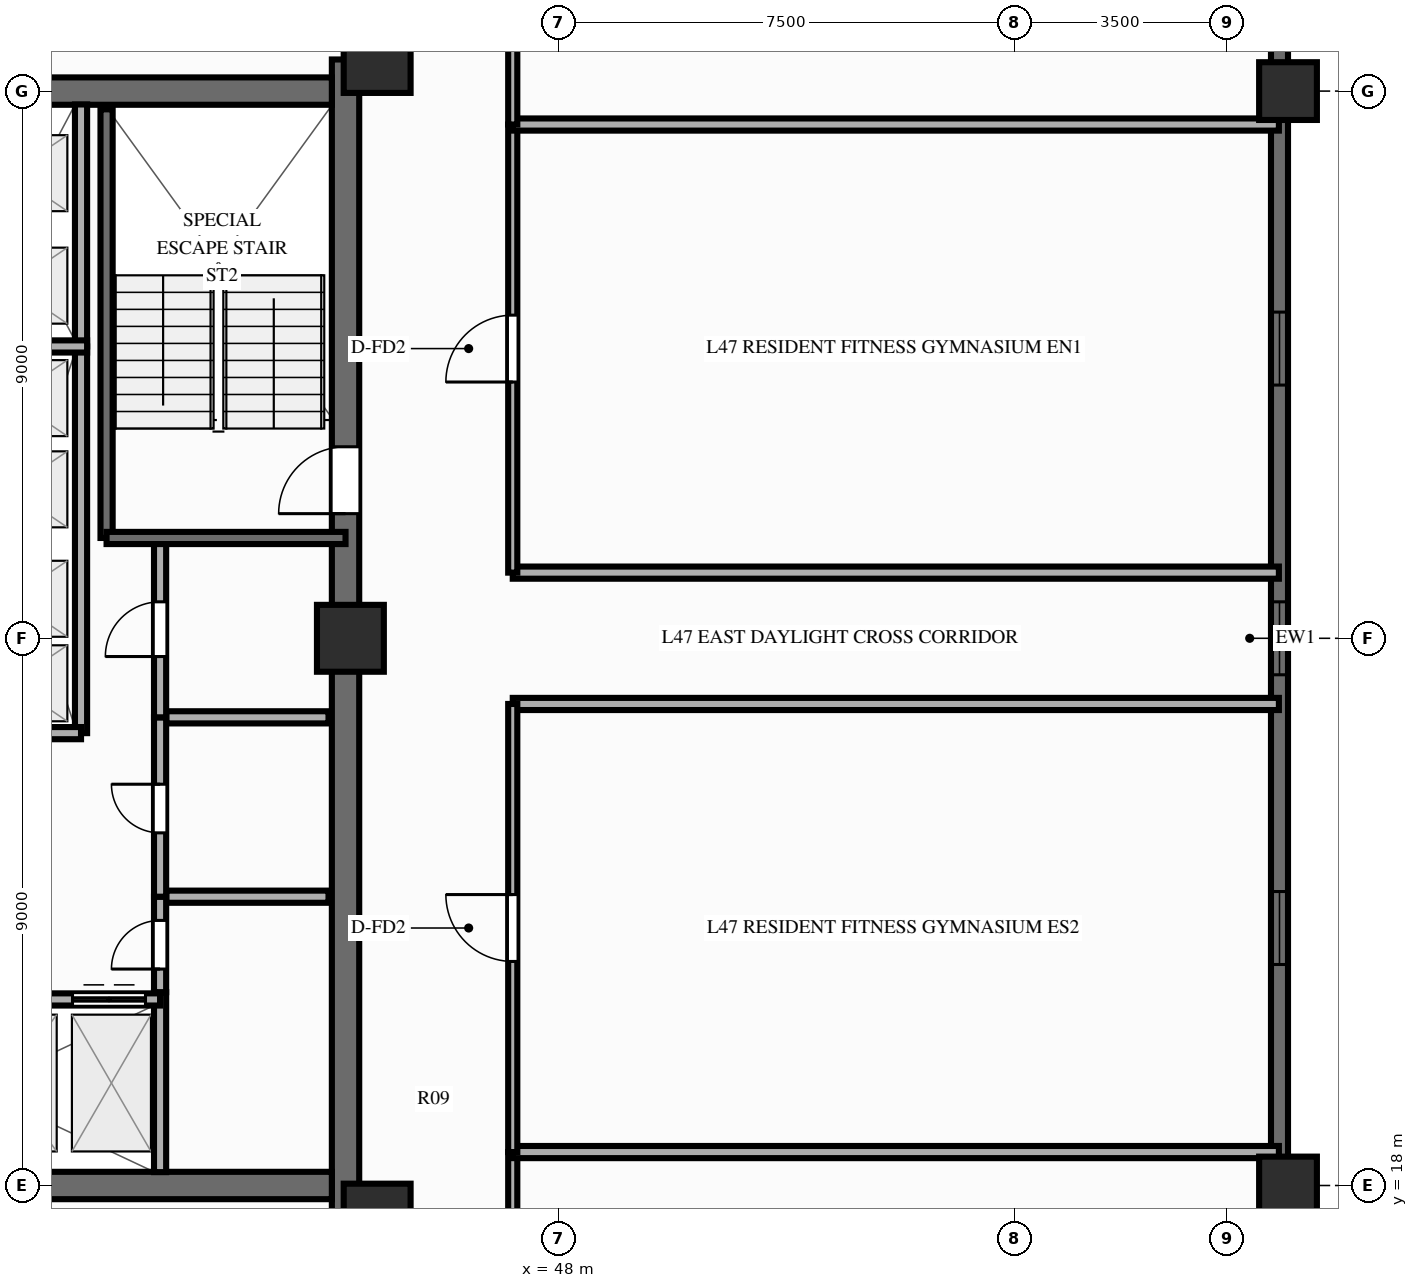
"""IFC4 building model, lengths in metres.
Left out: names, types, materials, properties, quantities, classifications, styles, units other than length and angle.
Written with IfcOpenShell. Run it as: python <this file> out.ifc"""

import sys

from ifc_helpers import new_model, si_unit, direction, frame, frame_2d, origin, origin_2d, place, context, subcontext, project, spatial, rectangle, extrude, source, transform, mapped, element, fill, save


model = new_model("IFC4")
c1 = context("Model", 3, precision=1e-05, world=origin(), true_north=direction((0.0, 1.0)))
c2 = subcontext(c1, "Body", "Model", "MODEL_VIEW")
j1 = project(units=[si_unit("LENGTHUNIT", "METRE"), si_unit("PLANEANGLEUNIT", "RADIAN")], contexts=[c1])
p1 = place(None, origin())
s1 = spatial("IfcSite", under=j1, at=p1, CompositionType="ELEMENT")
p2 = place(p1, origin())
s2 = spatial("IfcBuilding", under=s1, at=p2, CompositionType="ELEMENT")
p3 = place(p2, frame((0.0, 0.0, 148.7)))
s3 = spatial("IfcBuildingStorey", under=s2, at=p3, CompositionType="ELEMENT", Elevation=148.7)
p4 = place(p3, frame((44.5, 17.48, 0.0), z_axis=(0.0, 0.0, 1.0), x_axis=(0.0, 1.0, 0.0)))
e1 = element("IfcWall", 1, at=p4, inside=s3, PredefinedType="SHEAR", context=c2, shape_type="SweptSolid", body=[
    extrude(rectangle(XDim=19.04, YDim=0.45, at=frame_2d((9.52, 0.0))), origin(), (0.0, 0.0, 1.0), 3.5),
])
p5 = place(p4, frame((12.67, 0.0, 0.0), z_axis=(0.0, 0.0, 1.0), x_axis=(-1.0, 0.0, 0.0)))
e2 = element("IfcOpeningElement", 2, at=p5, cuts=e1, PredefinedType="OPENING", context=c2, shape_type="SweptSolid", body=[
    extrude(rectangle(XDim=1.1, YDim=2.15, at=frame_2d((0.55, 1.075))), frame((0.0, 0.237, 0.0), z_axis=(0.0, -1.0, 0.0), x_axis=(1.0, 0.0, 0.0)), (0.0, 0.0, 1.0), 0.474),
])
p6 = place(p3, frame((31.725, 18.0, 0.0), z_axis=(0.0, 0.0, 1.0), x_axis=(1.0, 0.0, 0.0)))
e3 = element("IfcWall", 3, at=p6, inside=s3, PredefinedType="SHEAR", context=c2, shape_type="SweptSolid", body=[
    extrude(rectangle(XDim=12.55, YDim=0.45, at=frame_2d((6.275, 0.0))), origin(), (0.0, 0.0, 1.0), 3.5),
])
p7 = place(p3, frame((31.725, 36.0, 0.0), z_axis=(0.0, 0.0, 1.0), x_axis=(1.0, 0.0, 0.0)))
e4 = element("IfcWall", 4, at=p7, inside=s3, PredefinedType="SHEAR", context=c2, shape_type="SweptSolid", body=[
    extrude(rectangle(XDim=12.55, YDim=0.45, at=frame_2d((6.275, 0.0))), origin(), (0.0, 0.0, 1.0), 3.5),
])
p8 = place(p7, frame((5.225, 0.0, 0.0), z_axis=(0.0, 0.0, 1.0), x_axis=(-1.0, 0.0, 0.0)))
e5 = element("IfcOpeningElement", 5, at=p8, cuts=e4, PredefinedType="OPENING", context=c2, shape_type="SweptSolid", body=[
    extrude(rectangle(XDim=1.4, YDim=2.15, at=frame_2d((0.7, 1.075))), frame((0.0, 0.237, 0.0), z_axis=(0.0, -1.0, 0.0), x_axis=(1.0, 0.0, 0.0)), (0.0, 0.0, 1.0), 0.474),
])
m1 = source(origin(), c2, "Body", "SweptSolid", [
    extrude(rectangle(XDim=1.1, YDim=1.1, at=origin_2d()), origin(), (0.0, 0.0, 1.0), 3.5),
])
for number, where, z_axis, x_axis in (
    (6, (45.02, 17.48, 0.0), (0.0, 0.0, 1.0), (1.0, 0.0, 0.0)),
    (7, (45.02, 36.52, 0.0), (0.0, 0.0, 1.0), (1.0, 0.0, 0.0)),
    (8, (44.58, 27.0, 0.0), (0.0, 0.0, 1.0), (1.0, 0.0, 0.0)),
):
    element("IfcColumn", number, at=place(p3, frame(where, z_axis=z_axis, x_axis=x_axis)), inside=s3, PredefinedType="COLUMN", context=c2, shape_type="MappedRepresentation", body=[
        mapped(m1, transform((0.0, 0.0, 0.0), scale=1.0)),
    ])
m2 = source(origin(), c2, "Body", "SweptSolid", [
    extrude(rectangle(XDim=0.95, YDim=0.95, at=origin_2d()), origin(), (0.0, 0.0, 1.0), 3.5),
])
for number, where, z_axis, x_axis in (
    (9, (60.0, 18.0, 0.0), (0.0, 0.0, 1.0), (1.0, 0.0, 0.0)),
    (10, (60.0, 36.0, 0.0), (0.0, 0.0, 1.0), (1.0, 0.0, 0.0)),
):
    element("IfcColumn", number, at=place(p3, frame(where, z_axis=z_axis, x_axis=x_axis)), inside=s3, PredefinedType="COLUMN", context=c2, shape_type="MappedRepresentation", body=[
        mapped(m2, transform((0.0, 0.0, 0.0), scale=1.0)),
    ])
p9 = place(p3, frame((59.86, 11.0, 0.0), z_axis=(0.0, 0.0, 1.0), x_axis=(0.0, 1.0, 0.0)))
e11 = element("IfcWall", 11, at=p9, inside=s3, PredefinedType="SOLIDWALL", context=c2, shape_type="SweptSolid", body=[
    extrude(rectangle(XDim=32.0, YDim=0.28, at=frame_2d((16.0, 0.0))), origin(), (0.0, 0.0, 1.0), 2.39),
])
p10 = place(p9, frame((2.9, 0.0, 0.25)))
e12 = element("IfcOpeningElement", 12, at=p10, cuts=e11, PredefinedType="OPENING", context=c2, shape_type="SweptSolid", body=[
    extrude(rectangle(XDim=1.2, YDim=1.5, at=frame_2d((0.6, 0.75))), frame((0.0, 0.152, 0.0), z_axis=(0.0, -1.0, 0.0), x_axis=(1.0, 0.0, 0.0)), (0.0, 0.0, 1.0), 0.304),
])
p11 = place(p9, frame((10.635, 0.0, 0.25)))
e13 = element("IfcOpeningElement", 13, at=p11, cuts=e11, PredefinedType="OPENING", context=c2, shape_type="SweptSolid", body=[
    extrude(rectangle(XDim=1.2, YDim=1.5, at=frame_2d((0.6, 0.75))), frame((0.0, 0.152, 0.0), z_axis=(0.0, -1.0, 0.0), x_axis=(1.0, 0.0, 0.0)), (0.0, 0.0, 1.0), 0.304),
])
p12 = place(p9, frame((15.4, 0.0, 0.25)))
e14 = element("IfcOpeningElement", 14, at=p12, cuts=e11, PredefinedType="OPENING", context=c2, shape_type="SweptSolid", body=[
    extrude(rectangle(XDim=1.2, YDim=1.5, at=frame_2d((0.6, 0.75))), frame((0.0, 0.152, 0.0), z_axis=(0.0, -1.0, 0.0), x_axis=(1.0, 0.0, 0.0)), (0.0, 0.0, 1.0), 0.304),
])
p13 = place(p9, frame((20.165, 0.0, 0.25)))
e15 = element("IfcOpeningElement", 15, at=p13, cuts=e11, PredefinedType="OPENING", context=c2, shape_type="SweptSolid", body=[
    extrude(rectangle(XDim=1.2, YDim=1.5, at=frame_2d((0.6, 0.75))), frame((0.0, 0.152, 0.0), z_axis=(0.0, -1.0, 0.0), x_axis=(1.0, 0.0, 0.0)), (0.0, 0.0, 1.0), 0.304),
])
p14 = place(p9, frame((27.9, 0.0, 0.25)))
e16 = element("IfcOpeningElement", 16, at=p14, cuts=e11, PredefinedType="OPENING", context=c2, shape_type="SweptSolid", body=[
    extrude(rectangle(XDim=1.2, YDim=1.5, at=frame_2d((0.6, 0.75))), frame((0.0, 0.152, 0.0), z_axis=(0.0, -1.0, 0.0), x_axis=(1.0, 0.0, 0.0)), (0.0, 0.0, 1.0), 0.304),
])
p15 = place(p3, frame((41.55, 22.75, 0.0), z_axis=(0.0, 0.0, 1.0), x_axis=(1.0, 0.0, 0.0)))
e17 = element("IfcWall", 17, at=p15, inside=s3, PredefinedType="PARTITIONING", context=c2, shape_type="SweptSolid", body=[
    extrude(rectangle(XDim=2.67, YDim=0.2, at=frame_2d((1.335, 0.0))), origin(), (0.0, 0.0, 1.0), 3.16),
])
p16 = place(p3, frame((41.55, 25.7, 0.0), z_axis=(0.0, 0.0, 1.0), x_axis=(1.0, 0.0, 0.0)))
e18 = element("IfcWall", 18, at=p16, inside=s3, PredefinedType="PARTITIONING", context=c2, shape_type="SweptSolid", body=[
    extrude(rectangle(XDim=2.67, YDim=0.2, at=frame_2d((1.335, 0.0))), origin(), (0.0, 0.0, 1.0), 2.64),
])
p17 = place(p3, frame((41.45, 18.22, 0.0), z_axis=(0.0, 0.0, 1.0), x_axis=(0.0, 1.0, 0.0)))
e19 = element("IfcWall", 19, at=p17, inside=s3, PredefinedType="PARTITIONING", context=c2, shape_type="SweptSolid", body=[
    extrude(rectangle(XDim=2.96, YDim=0.2, at=frame_2d((1.48, 0.0))), origin(), (0.0, 0.0, 1.0), 3.16),
])
p18 = place(p3, frame((41.45, 21.18, 0.0), z_axis=(0.0, 0.0, 1.0), x_axis=(0.0, 1.0, 0.0)))
e20 = element("IfcWall", 20, at=p18, inside=s3, PredefinedType="PARTITIONING", context=c2, shape_type="SweptSolid", body=[
    extrude(rectangle(XDim=1.57, YDim=0.2, at=frame_2d((0.785, 0.0))), origin(), (0.0, 0.0, 1.0), 3.16),
])
p19 = place(p18, frame((0.38, 0.0, 0.0)))
e21 = element("IfcOpeningElement", 21, at=p19, cuts=e20, PredefinedType="OPENING", context=c2, shape_type="SweptSolid", body=[
    extrude(rectangle(XDim=0.8, YDim=2.05, at=frame_2d((0.4, 1.025))), frame((0.0, 0.112, 0.0), z_axis=(0.0, -1.0, 0.0), x_axis=(1.0, 0.0, 0.0)), (0.0, 0.0, 1.0), 0.224),
])
p20 = place(p3, frame((41.45, 22.75, 0.0), z_axis=(0.0, 0.0, 1.0), x_axis=(0.0, 1.0, 0.0)))
e22 = element("IfcWall", 22, at=p20, inside=s3, PredefinedType="PARTITIONING", context=c2, shape_type="SweptSolid", body=[
    extrude(rectangle(XDim=2.95, YDim=0.2, at=frame_2d((1.475, 0.0))), origin(), (0.0, 0.0, 1.0), 3.16),
])
p21 = place(p20, frame((1.05, 0.0, 0.0)))
e23 = element("IfcOpeningElement", 23, at=p21, cuts=e22, PredefinedType="OPENING", context=c2, shape_type="SweptSolid", body=[
    extrude(rectangle(XDim=0.8, YDim=2.05, at=frame_2d((0.4, 1.025))), frame((0.0, 0.112, 0.0), z_axis=(0.0, -1.0, 0.0), x_axis=(1.0, 0.0, 0.0)), (0.0, 0.0, 1.0), 0.224),
])
p22 = place(p3, frame((41.45, 25.7, 0.0), z_axis=(0.0, 0.0, 1.0), x_axis=(0.0, 1.0, 0.0)))
e24 = element("IfcWall", 24, at=p22, inside=s3, PredefinedType="PARTITIONING", context=c2, shape_type="SweptSolid", body=[
    extrude(rectangle(XDim=2.9, YDim=0.2, at=frame_2d((1.45, 0.0))), origin(), (0.0, 0.0, 1.0), 3.16),
])
p23 = place(p22, frame((1.0, 0.0, 0.0)))
e25 = element("IfcOpeningElement", 25, at=p23, cuts=e24, PredefinedType="OPENING", context=c2, shape_type="SweptSolid", body=[
    extrude(rectangle(XDim=0.9, YDim=2.1, at=frame_2d((0.45, 1.05))), frame((0.0, 0.112, 0.0), z_axis=(0.0, -1.0, 0.0), x_axis=(1.0, 0.0, 0.0)), (0.0, 0.0, 1.0), 0.224),
])
p24 = place(p3, frame((40.15, 25.44, 0.0), z_axis=(0.0, 0.0, 1.0), x_axis=(0.0, 1.0, 0.0)))
e26 = element("IfcWall", 26, at=p24, inside=s3, PredefinedType="PARTITIONING", context=c2, shape_type="SweptSolid", body=[
    extrude(rectangle(XDim=6.36, YDim=0.2, at=frame_2d((3.18, 0.0))), origin(), (0.0, 0.0, 1.0), 3.16),
])
p25 = place(p3, frame((40.15, 31.8, 0.0), z_axis=(0.0, 0.0, 1.0), x_axis=(0.0, 1.0, 0.0)))
e27 = element("IfcWall", 27, at=p25, inside=s3, PredefinedType="PARTITIONING", context=c2, shape_type="SweptSolid", body=[
    extrude(rectangle(XDim=3.98, YDim=0.2, at=frame_2d((1.99, 0.0))), origin(), (0.0, 0.0, 1.0), 3.16),
])
p26 = place(p3, frame((35.43, 21.06, 0.0), z_axis=(0.0, 0.0, 1.0), x_axis=(1.0, 0.0, 0.0)))
e28 = element("IfcWall", 28, at=p26, inside=s3, PredefinedType="PARTITIONING", context=c2, shape_type="SweptSolid", body=[
    extrude(rectangle(XDim=6.02, YDim=0.2, at=frame_2d((3.01, 0.0))), origin(), (0.0, 0.0, 1.0), 3.16),
])
p27 = place(p26, frame((1.0, 0.0, 0.0)))
e29 = element("IfcOpeningElement", 29, at=p27, cuts=e28, PredefinedType="OPENING", context=c2, shape_type="SweptSolid", body=[
    extrude(rectangle(XDim=1.1, YDim=2.15, at=frame_2d((0.55, 1.075))), frame((0.0, 0.112, 0.0), z_axis=(0.0, -1.0, 0.0), x_axis=(1.0, 0.0, 0.0)), (0.0, 0.0, 1.0), 0.224),
])
p28 = place(p26, frame((2.95, 0.0, 0.0)))
e30 = element("IfcOpeningElement", 30, at=p28, cuts=e28, PredefinedType="OPENING", context=c2, shape_type="SweptSolid", body=[
    extrude(rectangle(XDim=1.1, YDim=2.15, at=frame_2d((0.55, 1.075))), frame((0.0, 0.112, 0.0), z_axis=(0.0, -1.0, 0.0), x_axis=(1.0, 0.0, 0.0)), (0.0, 0.0, 1.0), 0.224),
])
p29 = place(p26, frame((4.58, 0.0, 0.0)))
e31 = element("IfcOpeningElement", 31, at=p29, cuts=e28, PredefinedType="OPENING", context=c2, shape_type="SweptSolid", body=[
    extrude(rectangle(XDim=1.2, YDim=2.15, at=frame_2d((0.6, 1.075))), frame((0.0, 0.112, 0.0), z_axis=(0.0, -1.0, 0.0), x_axis=(1.0, 0.0, 0.0)), (0.0, 0.0, 1.0), 0.224),
])
p30 = place(p3, frame((35.43, 25.44, 0.0), z_axis=(0.0, 0.0, 1.0), x_axis=(1.0, 0.0, 0.0)))
e32 = element("IfcWall", 32, at=p30, inside=s3, PredefinedType="PARTITIONING", context=c2, shape_type="SweptSolid", body=[
    extrude(rectangle(XDim=4.72, YDim=0.2, at=frame_2d((2.36, 0.0))), origin(), (0.0, 0.0, 1.0), 3.16),
])
p31 = place(p30, frame((1.25, 0.0, 0.0)))
e33 = element("IfcOpeningElement", 33, at=p31, cuts=e32, PredefinedType="OPENING", context=c2, shape_type="SweptSolid", body=[
    extrude(rectangle(XDim=1.1, YDim=2.15, at=frame_2d((0.55, 1.075))), frame((0.0, 0.112, 0.0), z_axis=(0.0, -1.0, 0.0), x_axis=(1.0, 0.0, 0.0)), (0.0, 0.0, 1.0), 0.224),
])
p32 = place(p3, frame((40.57, 28.65, 0.0), z_axis=(0.0, 0.0, 1.0), x_axis=(0.0, 1.0, 0.0)))
e34 = element("IfcWall", 34, at=p32, inside=s3, PredefinedType="SOLIDWALL", context=c2, shape_type="SweptSolid", body=[
    extrude(rectangle(XDim=7.05, YDim=0.2, at=frame_2d((3.525, 0.0))), origin(), (0.0, 0.0, 1.0), 3.29),
])
p33 = place(p3, frame((40.57, 28.65, 0.0), z_axis=(0.0, 0.0, 1.0), x_axis=(1.0, 0.0, 0.0)))
e35 = element("IfcWall", 35, at=p33, inside=s3, PredefinedType="SOLIDWALL", context=c2, shape_type="SweptSolid", body=[
    extrude(rectangle(XDim=3.93, YDim=0.2, at=frame_2d((1.965, 0.0))), origin(), (0.0, 0.0, 1.0), 3.29),
])
p34 = place(p3, frame((37.9, 31.8, 0.0), z_axis=(0.0, 0.0, 1.0), x_axis=(1.0, 0.0, 0.0)))
e36 = element("IfcWall", 36, at=p34, inside=s3, PredefinedType="PARTITIONING", context=c2, shape_type="SweptSolid", body=[
    extrude(rectangle(XDim=2.35, YDim=0.2, at=frame_2d((1.175, 0.0))), origin(), (0.0, 0.0, 1.0), 3.16),
])
p35 = place(p3, frame((47.25, 25.92, 0.0), z_axis=(0.0, 0.0, 1.0), x_axis=(1.0, 0.0, 0.0)))
e37 = element("IfcWall", 37, at=p35, inside=s3, PredefinedType="PARTITIONING", context=c2, shape_type="SweptSolid", body=[
    extrude(rectangle(XDim=12.6, YDim=0.2, at=frame_2d((6.3, 0.0))), origin(), (0.0, 0.0, 1.0), 3.16),
])
p36 = place(p3, frame((47.25, 11.18, 0.0), z_axis=(0.0, 0.0, 1.0), x_axis=(0.0, 1.0, 0.0)))
e38 = element("IfcWall", 38, at=p36, inside=s3, PredefinedType="PARTITIONING", context=c2, shape_type="SweptSolid", body=[
    extrude(rectangle(XDim=7.37, YDim=0.15, at=frame_2d((3.685, 0.0))), origin(), (0.0, 0.0, 1.0), 3.16),
])
p37 = place(p36, frame((3.135, 0.0, 0.0)))
e39 = element("IfcOpeningElement", 39, at=p37, cuts=e38, PredefinedType="OPENING", context=c2, shape_type="SweptSolid", body=[
    extrude(rectangle(XDim=1.1, YDim=2.15, at=frame_2d((0.55, 1.075))), frame((0.0, 0.087, 0.0), z_axis=(0.0, -1.0, 0.0), x_axis=(1.0, 0.0, 0.0)), (0.0, 0.0, 1.0), 0.174),
])
p38 = place(p3, frame((47.25, 18.55, 0.0), z_axis=(0.0, 0.0, 1.0), x_axis=(1.0, 0.0, 0.0)))
e40 = element("IfcWall", 40, at=p38, inside=s3, PredefinedType="PARTITIONING", context=c2, shape_type="SweptSolid", body=[
    extrude(rectangle(XDim=12.6, YDim=0.2, at=frame_2d((6.3, 0.0))), origin(), (0.0, 0.0, 1.0), 3.16),
])
p39 = place(p3, frame((47.25, 18.55, 0.0), z_axis=(0.0, 0.0, 1.0), x_axis=(0.0, 1.0, 0.0)))
e41 = element("IfcWall", 41, at=p39, inside=s3, PredefinedType="PARTITIONING", context=c2, shape_type="SweptSolid", body=[
    extrude(rectangle(XDim=7.37, YDim=0.15, at=frame_2d((3.685, 0.0))), origin(), (0.0, 0.0, 1.0), 3.16),
])
p40 = place(p39, frame((3.135, 0.0, 0.0)))
e42 = element("IfcOpeningElement", 42, at=p40, cuts=e41, PredefinedType="OPENING", context=c2, shape_type="SweptSolid", body=[
    extrude(rectangle(XDim=1.1, YDim=2.15, at=frame_2d((0.55, 1.075))), frame((0.0, 0.087, 0.0), z_axis=(0.0, -1.0, 0.0), x_axis=(1.0, 0.0, 0.0)), (0.0, 0.0, 1.0), 0.174),
])
p41 = place(p3, frame((47.25, 28.08, 0.0), z_axis=(0.0, 0.0, 1.0), x_axis=(1.0, 0.0, 0.0)))
e43 = element("IfcWall", 43, at=p41, inside=s3, PredefinedType="PARTITIONING", context=c2, shape_type="SweptSolid", body=[
    extrude(rectangle(XDim=12.6, YDim=0.2, at=frame_2d((6.3, 0.0))), origin(), (0.0, 0.0, 1.0), 3.16),
])
p42 = place(p3, frame((47.25, 28.08, 0.0), z_axis=(0.0, 0.0, 1.0), x_axis=(0.0, 1.0, 0.0)))
e44 = element("IfcWall", 44, at=p42, inside=s3, PredefinedType="PARTITIONING", context=c2, shape_type="SweptSolid", body=[
    extrude(rectangle(XDim=7.37, YDim=0.15, at=frame_2d((3.685, 0.0))), origin(), (0.0, 0.0, 1.0), 3.16),
])
p43 = place(p42, frame((3.135, 0.0, 0.0)))
e45 = element("IfcOpeningElement", 45, at=p43, cuts=e44, PredefinedType="OPENING", context=c2, shape_type="SweptSolid", body=[
    extrude(rectangle(XDim=1.1, YDim=2.15, at=frame_2d((0.55, 1.075))), frame((0.0, 0.087, 0.0), z_axis=(0.0, -1.0, 0.0), x_axis=(1.0, 0.0, 0.0)), (0.0, 0.0, 1.0), 0.174),
])
p44 = place(p3, frame((47.25, 35.45, 0.0), z_axis=(0.0, 0.0, 1.0), x_axis=(1.0, 0.0, 0.0)))
e46 = element("IfcWall", 46, at=p44, inside=s3, PredefinedType="PARTITIONING", context=c2, shape_type="SweptSolid", body=[
    extrude(rectangle(XDim=12.6, YDim=0.2, at=frame_2d((6.3, 0.0))), origin(), (0.0, 0.0, 1.0), 3.16),
])
p45 = place(p3, frame((47.25, 35.45, 0.0), z_axis=(0.0, 0.0, 1.0), x_axis=(0.0, 1.0, 0.0)))
e47 = element("IfcWall", 47, at=p45, inside=s3, PredefinedType="PARTITIONING", context=c2, shape_type="SweptSolid", body=[
    extrude(rectangle(XDim=7.37, YDim=0.15, at=frame_2d((3.685, 0.0))), origin(), (0.0, 0.0, 1.0), 3.16),
])
p46 = place(p45, frame((3.135, 0.0, 0.0)))
e48 = element("IfcOpeningElement", 48, at=p46, cuts=e47, PredefinedType="OPENING", context=c2, shape_type="SweptSolid", body=[
    extrude(rectangle(XDim=1.1, YDim=2.15, at=frame_2d((0.55, 1.075))), frame((0.0, 0.087, 0.0), z_axis=(0.0, -1.0, 0.0), x_axis=(1.0, 0.0, 0.0)), (0.0, 0.0, 1.0), 0.174),
])
m3 = source(origin(), c2, "Body", "SweptSolid", [
    extrude(rectangle(XDim=1.2, YDim=1.5, at=frame_2d((0.6, 0.75))), frame((0.0, 0.03, 0.0), z_axis=(0.0, -1.0, 0.0), x_axis=(1.0, 0.0, 0.0)), (0.0, 0.0, 1.0), 0.06),
])
p47 = place(p11, origin())
e49 = element("IfcWindow", 49, at=p47, inside=s3, PartitioningType="SINGLE_PANEL", PredefinedType="WINDOW", context=c2, shape_type="MappedRepresentation", body=[
    mapped(m3, transform((0.0, 0.0, 0.0), scale=1.0)),
])
fill(e13, e49)
p48 = place(p12, origin())
e50 = element("IfcWindow", 50, at=p48, inside=s3, PartitioningType="SINGLE_PANEL", PredefinedType="WINDOW", context=c2, shape_type="MappedRepresentation", body=[
    mapped(m3, transform((0.0, 0.0, 0.0), scale=1.0)),
])
fill(e14, e50)
p49 = place(p13, origin())
e51 = element("IfcWindow", 51, at=p49, inside=s3, PartitioningType="SINGLE_PANEL", PredefinedType="WINDOW", context=c2, shape_type="MappedRepresentation", body=[
    mapped(m3, transform((0.0, 0.0, 0.0), scale=1.0)),
])
fill(e15, e51)
m4 = source(origin(), c2, "Body", "SweptSolid", [
    extrude(rectangle(XDim=1.1, YDim=2.15, at=frame_2d((0.55, 1.075))), frame((0.0, 0.025, 0.0), z_axis=(0.0, -1.0, 0.0), x_axis=(1.0, 0.0, 0.0)), (0.0, 0.0, 1.0), 0.05),
])
p50 = place(p5, origin())
e52 = element("IfcDoor", 52, at=p50, inside=s3, OperationType="SINGLE_SWING_RIGHT", PredefinedType="DOOR", context=c2, shape_type="MappedRepresentation", body=[
    mapped(m4, transform((0.0, 0.0, 0.0), scale=1.0)),
])
fill(e2, e52)
m5 = source(origin(), c2, "Body", "SweptSolid", [
    extrude(rectangle(XDim=0.8, YDim=2.05, at=frame_2d((0.4, 1.025))), frame((0.0, 0.025, 0.0), z_axis=(0.0, -1.0, 0.0), x_axis=(1.0, 0.0, 0.0)), (0.0, 0.0, 1.0), 0.05),
])
p51 = place(p19, origin())
e53 = element("IfcDoor", 53, at=p51, inside=s3, OperationType="SINGLE_SWING_LEFT", PredefinedType="DOOR", context=c2, shape_type="MappedRepresentation", body=[
    mapped(m5, transform((0.0, 0.0, 0.0), scale=1.0)),
])
fill(e21, e53)
p52 = place(p21, origin())
e54 = element("IfcDoor", 54, at=p52, inside=s3, OperationType="SINGLE_SWING_RIGHT", PredefinedType="DOOR", context=c2, shape_type="MappedRepresentation", body=[
    mapped(m5, transform((0.0, 0.0, 0.0), scale=1.0)),
])
fill(e23, e54)
m6 = source(origin(), c2, "Body", "SweptSolid", [
    extrude(rectangle(XDim=0.9, YDim=2.1, at=frame_2d((0.45, 1.05))), frame((0.0, 0.025, 0.0), z_axis=(0.0, -1.0, 0.0), x_axis=(1.0, 0.0, 0.0)), (0.0, 0.0, 1.0), 0.05),
])
p53 = place(p23, origin())
e55 = element("IfcDoor", 55, at=p53, inside=s3, OperationType="SINGLE_SWING_LEFT", PredefinedType="DOOR", context=c2, shape_type="MappedRepresentation", body=[
    mapped(m6, transform((0.0, 0.0, 0.0), scale=1.0)),
])
fill(e25, e55)
m7 = source(origin(), c2, "Body", "SweptSolid", [
    extrude(rectangle(XDim=1.2, YDim=2.15, at=frame_2d((0.6, 1.075))), frame((0.0, 0.025, 0.0), z_axis=(0.0, -1.0, 0.0), x_axis=(1.0, 0.0, 0.0)), (0.0, 0.0, 1.0), 0.05),
])
p54 = place(p29, origin())
e56 = element("IfcDoor", 56, at=p54, inside=s3, OperationType="DOUBLE_DOOR_SLIDING", PredefinedType="DOOR", context=c2, shape_type="MappedRepresentation", body=[
    mapped(m7, transform((0.0, 0.0, 0.0), scale=1.0)),
])
fill(e31, e56)
p55 = place(p40, origin())
e57 = element("IfcDoor", 57, at=p55, inside=s3, OperationType="SINGLE_SWING_RIGHT", PredefinedType="DOOR", context=c2, shape_type="MappedRepresentation", body=[
    mapped(m4, transform((0.0, 0.0, 0.0), scale=1.0)),
])
fill(e42, e57)
p56 = place(p43, origin())
e58 = element("IfcDoor", 58, at=p56, inside=s3, OperationType="SINGLE_SWING_LEFT", PredefinedType="DOOR", context=c2, shape_type="MappedRepresentation", body=[
    mapped(m4, transform((0.0, 0.0, 0.0), scale=1.0)),
])
fill(e45, e58)
save(model, sys.argv[1])
